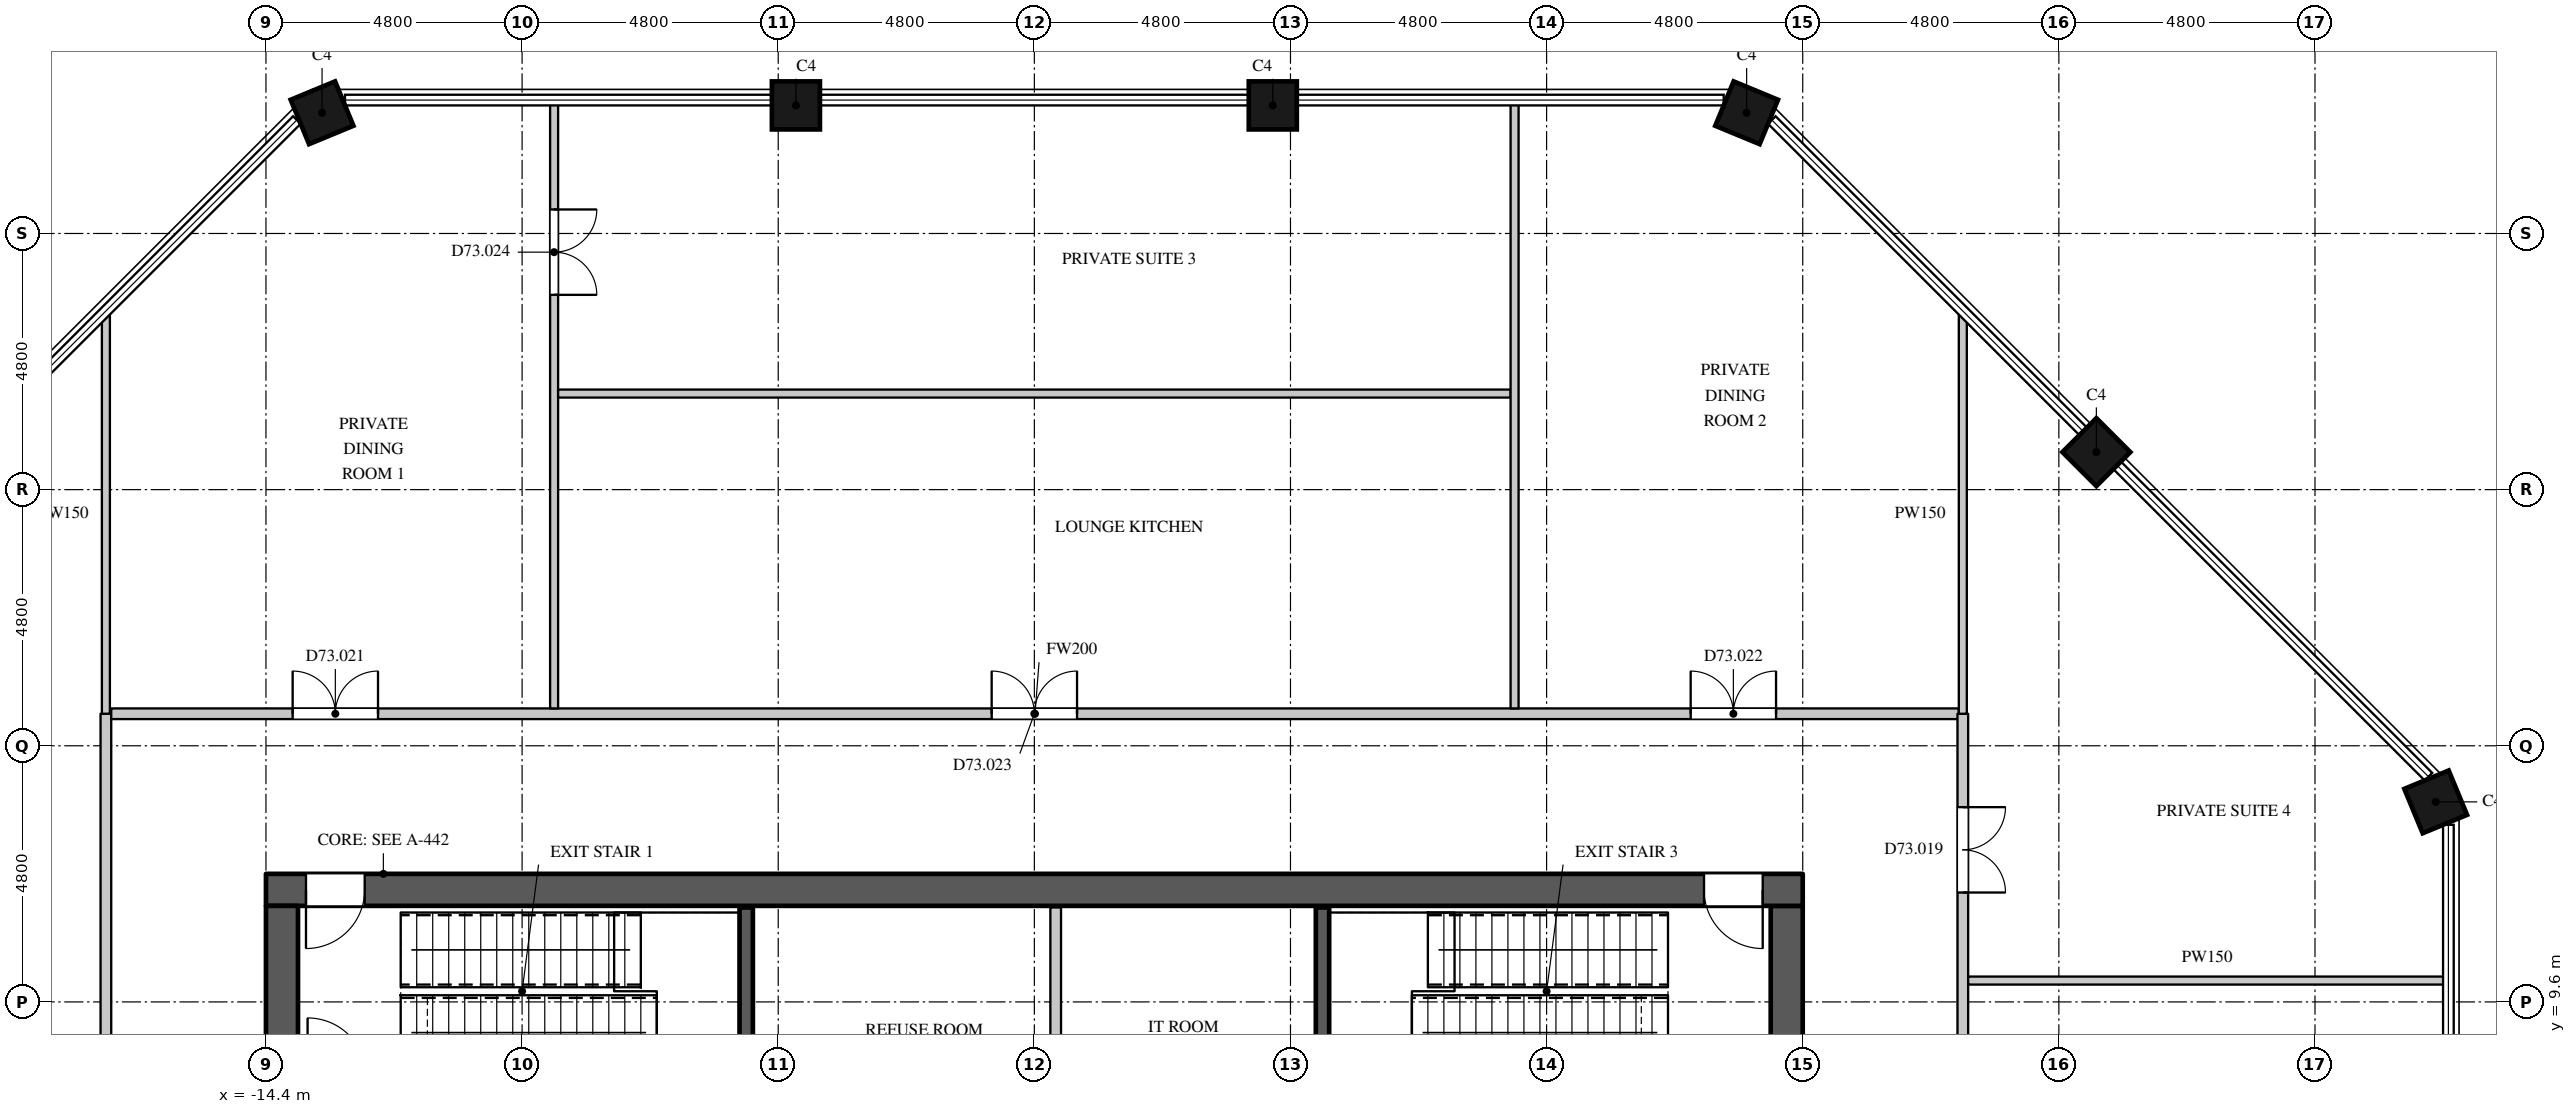
"""IFC4 building model, lengths in metres.
Left out: names, types, materials, properties, quantities, classifications, styles, units other than length and angle.
Written with IfcOpenShell. Run it as: python <this file> out.ifc"""

import sys

from ifc_helpers import new_model, si_unit, direction, frame, frame_2d, origin, origin_2d, place, context, subcontext, project, spatial, rectangle, extrude, element, fill, save


model = new_model("IFC4")
c1 = context("Model", 3, precision=1e-05, world=origin(), true_north=direction((0.0, 1.0)))
c2 = subcontext(c1, "Body", "Model", "MODEL_VIEW")
j1 = project(units=[si_unit("LENGTHUNIT", "METRE"), si_unit("PLANEANGLEUNIT", "RADIAN")], contexts=[c1])
p1 = place(None, origin())
s1 = spatial("IfcSite", under=j1, at=p1, CompositionType="ELEMENT")
p2 = place(p1, origin())
s2 = spatial("IfcBuilding", under=s1, at=p2, CompositionType="ELEMENT")
p3 = place(p2, frame((0.0, 0.0, 314.7)))
s3 = spatial("IfcBuildingStorey", under=s2, at=p3, CompositionType="ELEMENT", Elevation=314.7)
for number, where, z_axis, x_axis in (
    (1, (26.262, 13.349, 0.0), (0.0, 0.0, 1.0), (-0.383, 0.924, 0.0)),
    (2, (19.903, 19.903, 0.0), (0.0, 0.0, 1.0), (-0.707, 0.707, 0.0)),
    (3, (13.349, 26.262, 0.0), (0.0, 0.0, 1.0), (-0.924, 0.383, 0.0)),
    (4, (4.469, 26.4, 0.0), (0.0, 0.0, 1.0), (-1.0, 0.0, 0.0)),
    (5, (-4.469, 26.4, 0.0), (0.0, 0.0, 1.0), (-1.0, 0.0, 0.0)),
    (6, (-13.349, 26.262, 0.0), (0.0, 0.0, 1.0), (-0.924, -0.383, 0.0)),
):
    element("IfcColumn", number, at=place(p3, frame(where, z_axis=z_axis, x_axis=x_axis)), inside=s3, PredefinedType="COLUMN", context=c2, shape_type="SweptSolid", body=[
        extrude(rectangle(XDim=0.9, YDim=0.9, at=origin_2d()), origin(), (0.0, 0.0, 1.0), 5.4),
    ])
p4 = place(p3, frame((-14.4, 11.7, 0.0), z_axis=(0.0, 0.0, 1.0), x_axis=(1.0, 0.0, 0.0)))
e7 = element("IfcWall", 7, at=p4, inside=s3, PredefinedType="SHEAR", context=c2, shape_type="SweptSolid", body=[
    extrude(rectangle(XDim=28.8, YDim=0.6, at=frame_2d((14.4, 0.0))), origin(), (0.0, 0.0, 1.0), 5.4),
])
p5 = place(p4, frame((0.75, 0.0, 0.0)))
e8 = element("IfcOpeningElement", 8, at=p5, cuts=e7, PredefinedType="OPENING", context=c2, shape_type="SweptSolid", body=[
    extrude(rectangle(XDim=1.1, YDim=2.2, at=frame_2d((0.55, 1.1))), frame((0.0, 0.31, 0.0), z_axis=(0.0, -1.0, 0.0), x_axis=(1.0, 0.0, 0.0)), (0.0, 0.0, 1.0), 0.62),
])
p6 = place(p4, frame((26.95, 0.0, 0.0)))
e9 = element("IfcOpeningElement", 9, at=p6, cuts=e7, PredefinedType="OPENING", context=c2, shape_type="SweptSolid", body=[
    extrude(rectangle(XDim=1.1, YDim=2.2, at=frame_2d((0.55, 1.1))), frame((0.0, 0.31, 0.0), z_axis=(0.0, -1.0, 0.0), x_axis=(1.0, 0.0, 0.0)), (0.0, 0.0, 1.0), 0.62),
])
p7 = place(p3, frame((14.1, -11.4, 0.0), z_axis=(0.0, 0.0, 1.0), x_axis=(0.0, 1.0, 0.0)))
e10 = element("IfcWall", 10, at=p7, inside=s3, PredefinedType="SHEAR", context=c2, shape_type="SweptSolid", body=[
    extrude(rectangle(XDim=22.8, YDim=0.6, at=frame_2d((11.4, 0.0))), origin(), (0.0, 0.0, 1.0), 5.4),
])
p8 = place(p7, frame((6.35, 0.0, 0.0)))
e11 = element("IfcOpeningElement", 11, at=p8, cuts=e10, PredefinedType="OPENING", context=c2, shape_type="SweptSolid", body=[
    extrude(rectangle(XDim=1.5, YDim=2.4, at=frame_2d((0.75, 1.2))), frame((0.0, 0.31, 0.0), z_axis=(0.0, -1.0, 0.0), x_axis=(1.0, 0.0, 0.0)), (0.0, 0.0, 1.0), 0.62),
])
p9 = place(p3, frame((-14.1, -11.4, 0.0), z_axis=(0.0, 0.0, 1.0), x_axis=(0.0, 1.0, 0.0)))
e12 = element("IfcWall", 12, at=p9, inside=s3, PredefinedType="SHEAR", context=c2, shape_type="SweptSolid", body=[
    extrude(rectangle(XDim=22.8, YDim=0.6, at=frame_2d((11.4, 0.0))), origin(), (0.0, 0.0, 1.0), 5.4),
])
p10 = place(p9, frame((16.1, 0.0, 0.0)))
e13 = element("IfcOpeningElement", 13, at=p10, cuts=e12, PredefinedType="OPENING", context=c2, shape_type="SweptSolid", body=[
    extrude(rectangle(XDim=1.5, YDim=2.4, at=frame_2d((0.75, 1.2))), frame((0.0, 0.31, 0.0), z_axis=(0.0, -1.0, 0.0), x_axis=(1.0, 0.0, 0.0)), (0.0, 0.0, 1.0), 0.62),
])
p11 = place(p9, frame((5.1, 0.0, 0.0)))
e14 = element("IfcOpeningElement", 14, at=p11, cuts=e12, PredefinedType="OPENING", context=c2, shape_type="SweptSolid", body=[
    extrude(rectangle(XDim=1.5, YDim=2.4, at=frame_2d((0.75, 1.2))), frame((0.0, 0.31, 0.0), z_axis=(0.0, -1.0, 0.0), x_axis=(1.0, 0.0, 0.0)), (0.0, 0.0, 1.0), 0.62),
])
p12 = place(p3, frame((-17.4, -15.0, 0.0), z_axis=(0.0, 0.0, 1.0), x_axis=(0.0, 1.0, 0.0)))
e15 = element("IfcWall", 15, at=p12, inside=s3, PredefinedType="PARTITIONING", context=c2, shape_type="SweptSolid", body=[
    extrude(rectangle(XDim=30.0, YDim=0.2, at=frame_2d((15.0, 0.0))), origin(), (0.0, 0.0, 1.0), 5.1),
])
p13 = place(p12, frame((6.75, 0.0, 0.0)))
e16 = element("IfcOpeningElement", 16, at=p13, cuts=e15, PredefinedType="OPENING", context=c2, shape_type="SweptSolid", body=[
    extrude(rectangle(XDim=1.6, YDim=2.4, at=frame_2d((0.8, 1.2))), frame((0.0, 0.11, 0.0), z_axis=(0.0, -1.0, 0.0), x_axis=(1.0, 0.0, 0.0)), (0.0, 0.0, 1.0), 0.22),
])
p14 = place(p12, frame((21.6, 0.0, 0.0)))
e17 = element("IfcOpeningElement", 17, at=p14, cuts=e15, PredefinedType="OPENING", context=c2, shape_type="SweptSolid", body=[
    extrude(rectangle(XDim=1.6, YDim=2.4, at=frame_2d((0.8, 1.2))), frame((0.0, 0.11, 0.0), z_axis=(0.0, -1.0, 0.0), x_axis=(1.0, 0.0, 0.0)), (0.0, 0.0, 1.0), 0.22),
])
p15 = place(p3, frame((-17.3, 15.0, 0.0), z_axis=(0.0, 0.0, 1.0), x_axis=(1.0, 0.0, 0.0)))
e18 = element("IfcWall", 18, at=p15, inside=s3, PredefinedType="PARTITIONING", context=c2, shape_type="SweptSolid", body=[
    extrude(rectangle(XDim=34.625, YDim=0.2, at=frame_2d((17.312, 0.0))), origin(), (0.0, 0.0, 1.0), 5.1),
])
p16 = place(p15, frame((3.4, 0.0, 0.0)))
e19 = element("IfcOpeningElement", 19, at=p16, cuts=e18, PredefinedType="OPENING", context=c2, shape_type="SweptSolid", body=[
    extrude(rectangle(XDim=1.6, YDim=2.4, at=frame_2d((0.8, 1.2))), frame((0.0, 0.11, 0.0), z_axis=(0.0, -1.0, 0.0), x_axis=(1.0, 0.0, 0.0)), (0.0, 0.0, 1.0), 0.22),
])
p17 = place(p15, frame((29.6, 0.0, 0.0)))
e20 = element("IfcOpeningElement", 20, at=p17, cuts=e18, PredefinedType="OPENING", context=c2, shape_type="SweptSolid", body=[
    extrude(rectangle(XDim=1.6, YDim=2.4, at=frame_2d((0.8, 1.2))), frame((0.0, 0.11, 0.0), z_axis=(0.0, -1.0, 0.0), x_axis=(1.0, 0.0, 0.0)), (0.0, 0.0, 1.0), 0.22),
])
p18 = place(p15, frame((16.5, 0.0, 0.0)))
e21 = element("IfcOpeningElement", 21, at=p18, cuts=e18, PredefinedType="OPENING", context=c2, shape_type="SweptSolid", body=[
    extrude(rectangle(XDim=1.6, YDim=2.4, at=frame_2d((0.8, 1.2))), frame((0.0, 0.11, 0.0), z_axis=(0.0, -1.0, 0.0), x_axis=(1.0, 0.0, 0.0)), (0.0, 0.0, 1.0), 0.22),
])
p19 = place(p3, frame((17.4, -15.0, 0.0), z_axis=(0.0, 0.0, 1.0), x_axis=(0.0, 1.0, 0.0)))
e22 = element("IfcWall", 22, at=p19, inside=s3, PredefinedType="PARTITIONING", context=c2, shape_type="SweptSolid", body=[
    extrude(rectangle(XDim=30.0, YDim=0.2, at=frame_2d((15.0, 0.0))), origin(), (0.0, 0.0, 1.0), 5.1),
])
p20 = place(p19, frame((14.2, 0.0, 0.0)))
e23 = element("IfcOpeningElement", 23, at=p20, cuts=e22, PredefinedType="OPENING", context=c2, shape_type="SweptSolid", body=[
    extrude(rectangle(XDim=1.6, YDim=2.4, at=frame_2d((0.8, 1.2))), frame((0.0, 0.11, 0.0), z_axis=(0.0, -1.0, 0.0), x_axis=(1.0, 0.0, 0.0)), (0.0, 0.0, 1.0), 0.22),
])
p21 = place(p19, frame((26.65, 0.0, 0.0)))
e24 = element("IfcOpeningElement", 24, at=p21, cuts=e22, PredefinedType="OPENING", context=c2, shape_type="SweptSolid", body=[
    extrude(rectangle(XDim=1.6, YDim=2.4, at=frame_2d((0.8, 1.2))), frame((0.0, 0.11, 0.0), z_axis=(0.0, -1.0, 0.0), x_axis=(1.0, 0.0, 0.0)), (0.0, 0.0, 1.0), 0.22),
])
p22 = place(p19, frame((1.75, 0.0, 0.0)))
e25 = element("IfcOpeningElement", 25, at=p22, cuts=e22, PredefinedType="OPENING", context=c2, shape_type="SweptSolid", body=[
    extrude(rectangle(XDim=1.6, YDim=2.4, at=frame_2d((0.8, 1.2))), frame((0.0, 0.11, 0.0), z_axis=(0.0, -1.0, 0.0), x_axis=(1.0, 0.0, 0.0)), (0.0, 0.0, 1.0), 0.22),
])
p23 = place(p3, frame((-17.4, 15.0, 0.0), z_axis=(0.0, 0.0, 1.0), x_axis=(0.0, 1.0, 0.0)))
e26 = element("IfcWall", 26, at=p23, inside=s3, PredefinedType="PARTITIONING", context=c2, shape_type="SweptSolid", body=[
    extrude(rectangle(XDim=7.484, YDim=0.15, at=frame_2d((3.742, 0.0))), origin(), (0.0, 0.0, 1.0), 5.1),
])
p24 = place(p3, frame((-9.0, 15.1, 0.0), z_axis=(0.0, 0.0, 1.0), x_axis=(0.0, 1.0, 0.0)))
e27 = element("IfcWall", 27, at=p24, inside=s3, PredefinedType="PARTITIONING", context=c2, shape_type="SweptSolid", body=[
    extrude(rectangle(XDim=11.325, YDim=0.15, at=frame_2d((5.663, 0.0))), origin(), (0.0, 0.0, 1.0), 5.1),
])
p25 = place(p24, frame((7.75, 0.0, 0.0)))
e28 = element("IfcOpeningElement", 28, at=p25, cuts=e27, PredefinedType="OPENING", context=c2, shape_type="SweptSolid", body=[
    extrude(rectangle(XDim=1.6, YDim=2.4, at=frame_2d((0.8, 1.2))), frame((0.0, 0.085, 0.0), z_axis=(0.0, -1.0, 0.0), x_axis=(1.0, 0.0, 0.0)), (0.0, 0.0, 1.0), 0.17),
])
p26 = place(p3, frame((-8.925, 21.0, 0.0), z_axis=(0.0, 0.0, 1.0), x_axis=(1.0, 0.0, 0.0)))
e29 = element("IfcWall", 29, at=p26, inside=s3, PredefinedType="PARTITIONING", context=c2, shape_type="SweptSolid", body=[
    extrude(rectangle(XDim=17.85, YDim=0.15, at=frame_2d((8.925, 0.0))), origin(), (0.0, 0.0, 1.0), 5.1),
])
p27 = place(p3, frame((9.0, 15.1, 0.0), z_axis=(0.0, 0.0, 1.0), x_axis=(0.0, 1.0, 0.0)))
e30 = element("IfcWall", 30, at=p27, inside=s3, PredefinedType="PARTITIONING", context=c2, shape_type="SweptSolid", body=[
    extrude(rectangle(XDim=11.325, YDim=0.15, at=frame_2d((5.663, 0.0))), origin(), (0.0, 0.0, 1.0), 5.1),
])
p28 = place(p3, frame((17.5, 10.0, 0.0), z_axis=(0.0, 0.0, 1.0), x_axis=(1.0, 0.0, 0.0)))
e31 = element("IfcWall", 31, at=p28, inside=s3, PredefinedType="PARTITIONING", context=c2, shape_type="SweptSolid", body=[
    extrude(rectangle(XDim=8.955, YDim=0.15, at=frame_2d((4.478, 0.0))), origin(), (0.0, 0.0, 1.0), 5.1),
])
p29 = place(p3, frame((17.4, 15.0, 0.0), z_axis=(0.0, 0.0, 1.0), x_axis=(0.0, 1.0, 0.0)))
e32 = element("IfcWall", 32, at=p29, inside=s3, PredefinedType="PARTITIONING", context=c2, shape_type="SweptSolid", body=[
    extrude(rectangle(XDim=7.484, YDim=0.15, at=frame_2d((3.742, 0.0))), origin(), (0.0, 0.0, 1.0), 5.1),
])
p30 = place(p3, frame((0.4, 5.9, 0.0), z_axis=(0.0, 0.0, 1.0), x_axis=(0.0, 1.0, 0.0)))
e33 = element("IfcWall", 33, at=p30, inside=s3, PredefinedType="PARTITIONING", context=c2, shape_type="SweptSolid", body=[
    extrude(rectangle(XDim=5.47, YDim=0.2, at=frame_2d((2.735, 0.0))), origin(), (0.0, 0.0, 1.0), 5.1),
])
for number, where, z_axis, x_axis in (
    (34, (-5.4, 8.325, 0.0), (0.0, 0.0, 1.0), (0.0, 1.0, 0.0)),
    (35, (5.4, 8.325, 0.0), (0.0, 0.0, 1.0), (0.0, 1.0, 0.0)),
):
    element("IfcWall", number, at=place(p3, frame(where, z_axis=z_axis, x_axis=x_axis)), inside=s3, PredefinedType="SHEAR", context=c2, shape_type="SweptSolid", body=[
        extrude(rectangle(XDim=3.045, YDim=0.25, at=frame_2d((1.522, 0.0))), origin(), (0.0, 0.0, 1.0), 5.1),
    ])
p31 = place(p21, origin())
e36 = element("IfcDoor", 36, at=p31, inside=s3, OperationType="DOUBLE_DOOR_SINGLE_SWING", PredefinedType="DOOR", context=c2, shape_type="SweptSolid", body=[
    extrude(rectangle(XDim=1.6, YDim=2.4, at=frame_2d((0.8, 1.2))), frame((0.0, 0.025, 0.0), z_axis=(0.0, -1.0, 0.0), x_axis=(1.0, 0.0, 0.0)), (0.0, 0.0, 1.0), 0.05),
])
fill(e24, e36)
p32 = place(p16, origin())
e37 = element("IfcDoor", 37, at=p32, inside=s3, OperationType="DOUBLE_DOOR_SINGLE_SWING", PredefinedType="DOOR", context=c2, shape_type="SweptSolid", body=[
    extrude(rectangle(XDim=1.6, YDim=2.4, at=frame_2d((0.8, 1.2))), frame((0.0, 0.025, 0.0), z_axis=(0.0, -1.0, 0.0), x_axis=(1.0, 0.0, 0.0)), (0.0, 0.0, 1.0), 0.05),
])
fill(e19, e37)
p33 = place(p17, origin())
e38 = element("IfcDoor", 38, at=p33, inside=s3, OperationType="DOUBLE_DOOR_SINGLE_SWING", PredefinedType="DOOR", context=c2, shape_type="SweptSolid", body=[
    extrude(rectangle(XDim=1.6, YDim=2.4, at=frame_2d((0.8, 1.2))), frame((0.0, 0.025, 0.0), z_axis=(0.0, -1.0, 0.0), x_axis=(1.0, 0.0, 0.0)), (0.0, 0.0, 1.0), 0.05),
])
fill(e20, e38)
p34 = place(p18, origin())
e39 = element("IfcDoor", 39, at=p34, inside=s3, OperationType="DOUBLE_DOOR_SINGLE_SWING", PredefinedType="DOOR", context=c2, shape_type="SweptSolid", body=[
    extrude(rectangle(XDim=1.6, YDim=2.4, at=frame_2d((0.8, 1.2))), frame((0.0, 0.025, 0.0), z_axis=(0.0, -1.0, 0.0), x_axis=(1.0, 0.0, 0.0)), (0.0, 0.0, 1.0), 0.05),
])
fill(e21, e39)
p35 = place(p25, origin())
e40 = element("IfcDoor", 40, at=p35, inside=s3, OperationType="DOUBLE_DOOR_SINGLE_SWING", PredefinedType="DOOR", context=c2, shape_type="SweptSolid", body=[
    extrude(rectangle(XDim=1.6, YDim=2.4, at=frame_2d((0.8, 1.2))), frame((0.0, 0.025, 0.0), z_axis=(0.0, -1.0, 0.0), x_axis=(1.0, 0.0, 0.0)), (0.0, 0.0, 1.0), 0.05),
])
fill(e28, e40)
p36 = place(p5, origin())
e41 = element("IfcDoor", 41, at=p36, inside=s3, OperationType="SINGLE_SWING_RIGHT", PredefinedType="DOOR", context=c2, shape_type="SweptSolid", body=[
    extrude(rectangle(XDim=1.1, YDim=2.2, at=frame_2d((0.55, 1.1))), frame((0.0, -0.245, 0.0), z_axis=(0.0, -1.0, 0.0), x_axis=(1.0, 0.0, 0.0)), (0.0, 0.0, 1.0), 0.05),
])
fill(e8, e41)
p37 = place(p6, origin())
e42 = element("IfcDoor", 42, at=p37, inside=s3, OperationType="SINGLE_SWING_LEFT", PredefinedType="DOOR", context=c2, shape_type="SweptSolid", body=[
    extrude(rectangle(XDim=1.1, YDim=2.2, at=frame_2d((0.55, 1.1))), frame((0.0, -0.245, 0.0), z_axis=(0.0, -1.0, 0.0), x_axis=(1.0, 0.0, 0.0)), (0.0, 0.0, 1.0), 0.05),
])
fill(e9, e42)
save(model, sys.argv[1])
